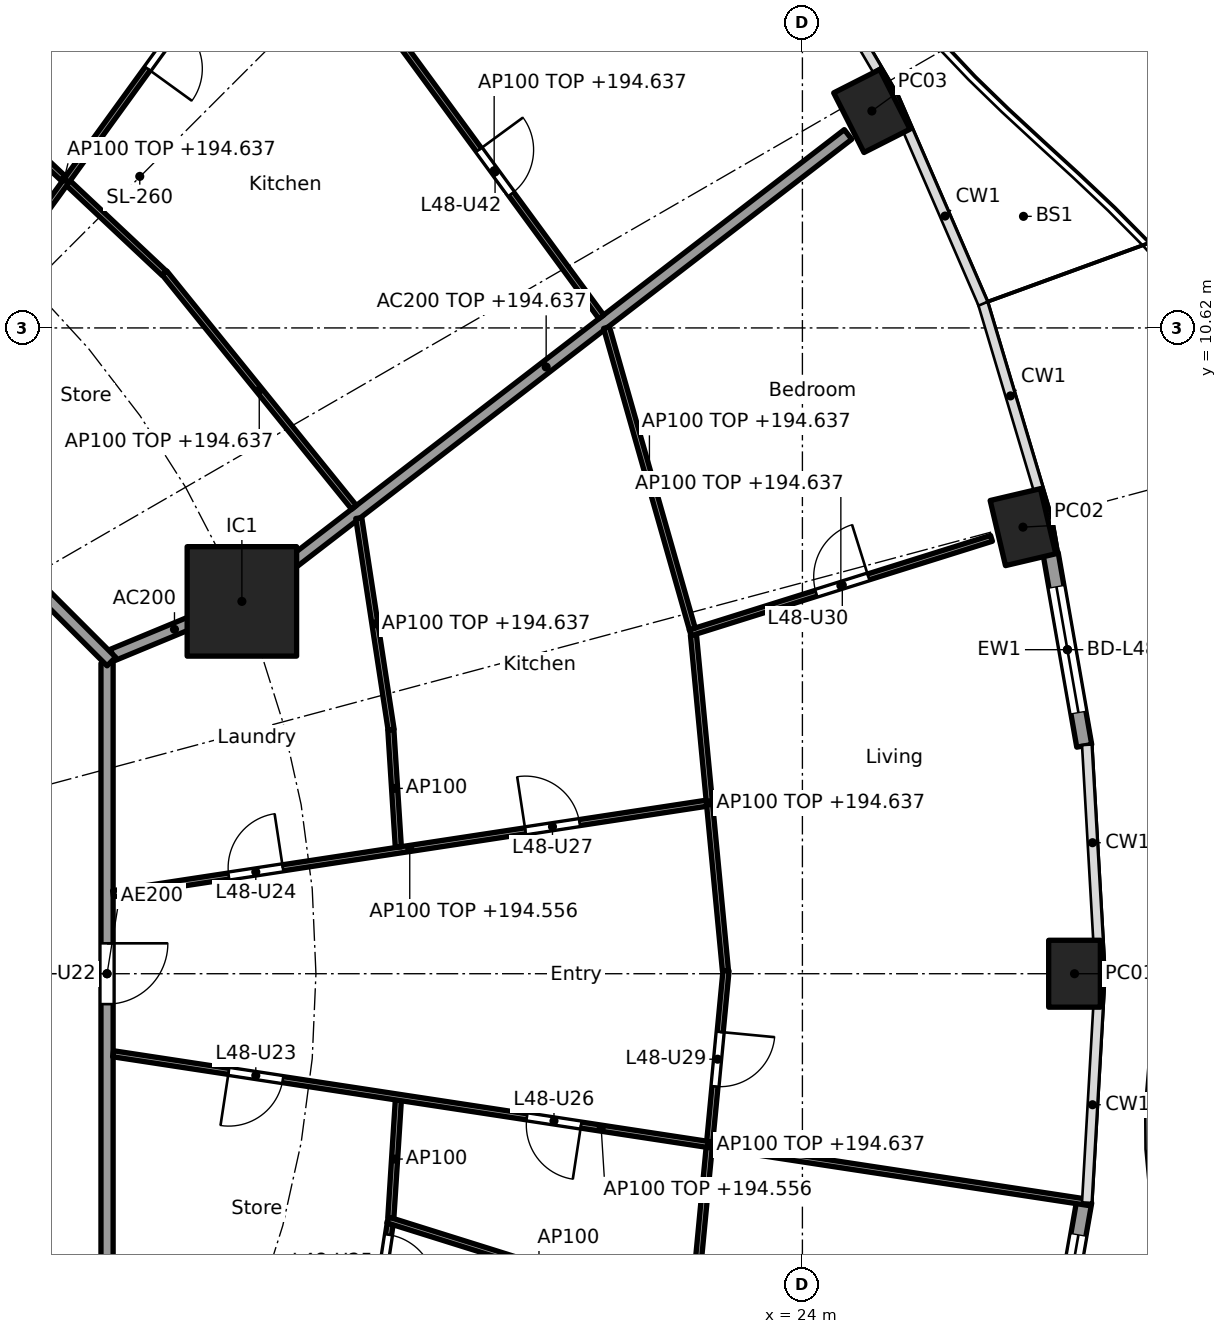
"""IFC4 building model, lengths in metres.
Left out: names, types, materials, properties, quantities, classifications, styles, units other than length and angle.
Written with IfcOpenShell. Run it as: python <this file> out.ifc"""

import sys

from ifc_helpers import new_model, si_unit, direction, frame, frame_2d, origin, origin_2d, place, context, subcontext, project, spatial, rectangle, hollow_rectangle, extrude, element, fill, save


model = new_model("IFC4")
c1 = context("Model", 3, precision=1e-05, world=origin(), true_north=direction((0.0, 1.0)))
c2 = subcontext(c1, "Body", "Model", "MODEL_VIEW")
j1 = project(units=[si_unit("LENGTHUNIT", "METRE"), si_unit("PLANEANGLEUNIT", "RADIAN")], contexts=[c1])
p1 = place(None, origin())
s1 = spatial("IfcSite", under=j1, at=p1, CompositionType="ELEMENT")
p2 = place(p1, origin())
s2 = spatial("IfcBuilding", under=s1, at=p2, CompositionType="ELEMENT")
p3 = place(p2, frame((0.0, 0.0, 191.8)))
s3 = spatial("IfcBuildingStorey", under=s2, at=p3, CompositionType="ELEMENT", Elevation=191.8)
for number, where, z_axis, x_axis in (
    (1, (28.475, 0.0, 0.0), (0.0, 0.0, 1.0), (0.0, 1.0, 0.0)),
    (2, (27.627, 7.344, 0.0), (0.0, 0.0, 1.0), (-0.229, 0.973, 0.0)),
    (3, (25.142, 14.188, 0.0), (0.0, 0.0, 1.0), (-0.452, 0.892, 0.0)),
):
    element("IfcColumn", number, at=place(p3, frame(where, z_axis=z_axis, x_axis=x_axis)), inside=s3, PredefinedType="COLUMN", context=c2, shape_type="SweptSolid", body=[
        extrude(hollow_rectangle(XDim=1.1, YDim=0.85, WallThickness=0.036, at=origin_2d()), origin(), (0.0, 0.0, 1.0), 3.7),
    ])
p4 = place(p3, frame((14.782, 6.123, 0.0), z_axis=(0.0, 0.0, 1.0), x_axis=(1.0, 0.0, 0.0)))
e4 = element("IfcColumn", 4, at=p4, inside=s3, PredefinedType="COLUMN", context=c2, shape_type="SweptSolid", body=[
    extrude(rectangle(XDim=1.8, YDim=1.8, at=origin_2d()), origin(), (0.0, 0.0, 1.0), 3.7),
])
p5 = place(p3, frame((28.082, 6.91, 0.0), z_axis=(0.0, 0.0, 1.0), x_axis=(0.172149769468, -0.985070787747, 0.0)))
e5 = element("IfcWall", 5, at=p5, inside=s3, PredefinedType="SOLIDWALL", context=c2, shape_type="SweptSolid", body=[
    extrude(rectangle(XDim=3.211, YDim=0.25, at=frame_2d((1.605, 0.0))), origin(), (0.0, 0.0, 1.0), 3.44),
])
p6 = place(p5, frame((0.555, 0.0, 0.0)))
e6 = element("IfcOpeningElement", 6, at=p6, cuts=e5, PredefinedType="OPENING", context=c2, shape_type="SweptSolid", body=[
    extrude(rectangle(XDim=2.1, YDim=2.4, at=frame_2d((1.05, 1.2))), frame((0.0, 0.135, 0.0), z_axis=(0.0, -1.0, 0.0), x_axis=(1.0, 0.0, 0.0)), (0.0, 0.0, 1.0), 0.27),
])
p7 = place(p3, frame((28.635, -3.747, 0.0), z_axis=(0.0, 0.0, 1.0), x_axis=(-0.172149769468, -0.985070787747, 0.0)))
e7 = element("IfcWall", 7, at=p7, inside=s3, PredefinedType="SOLIDWALL", context=c2, shape_type="SweptSolid", body=[
    extrude(rectangle(XDim=3.211, YDim=0.25, at=frame_2d((1.605, 0.0))), origin(), (0.0, 0.0, 1.0), 3.44),
])
p8 = place(p7, frame((0.555, 0.0, 0.0)))
e8 = element("IfcOpeningElement", 8, at=p8, cuts=e7, PredefinedType="OPENING", context=c2, shape_type="SweptSolid", body=[
    extrude(rectangle(XDim=2.1, YDim=2.4, at=frame_2d((1.05, 1.2))), frame((0.0, 0.135, 0.0), z_axis=(0.0, -1.0, 0.0), x_axis=(1.0, 0.0, 0.0)), (0.0, 0.0, 1.0), 0.27),
])
p9 = place(p3, frame((12.657, 5.243, 0.0), z_axis=(0.0, 0.0, 1.0), x_axis=(0.92383017907, 0.382802560388, 0.0)))
e9 = element("IfcWall", 9, at=p9, inside=s3, PredefinedType="PARTITIONING", context=c2, shape_type="SweptSolid", body=[
    extrude(rectangle(XDim=2.2, YDim=0.2, at=frame_2d((1.1, 0.0))), origin(), (0.0, 0.0, 1.0), 3.44),
])
p10 = place(p3, frame((14.822, 6.154, 0.0), z_axis=(0.0, 0.0, 1.0), x_axis=(0.792203056092, 0.610257583254, 0.0)))
e10 = element("IfcWall", 10, at=p10, inside=s3, PredefinedType="PARTITIONING", context=c2, shape_type="SweptSolid", body=[
    extrude(rectangle(XDim=12.533, YDim=0.2, at=frame_2d((6.266, 0.0))), origin(), (0.0, 0.0, 1.0), 2.837),
])
p11 = place(p3, frame((12.565, -5.104, 0.0), z_axis=(0.0, 0.0, 1.0), x_axis=(0.0, 1.0, 0.0)))
e11 = element("IfcWall", 11, at=p11, inside=s3, PredefinedType="PARTITIONING", context=c2, shape_type="SweptSolid", body=[
    extrude(rectangle(XDim=10.209, YDim=0.2, at=frame_2d((5.104, 0.0))), origin(), (0.0, 0.0, 1.0), 3.44),
])
p12 = place(p11, frame((4.604, 0.0, 0.0)))
e12 = element("IfcOpeningElement", 12, at=p12, cuts=e11, PredefinedType="OPENING", context=c2, shape_type="SweptSolid", body=[
    extrude(rectangle(XDim=1.0, YDim=2.1, at=frame_2d((0.5, 1.05))), frame((0.0, 0.11, 0.0), z_axis=(0.0, -1.0, 0.0), x_axis=(1.0, 0.0, 0.0)), (0.0, 0.0, 1.0), 0.22),
])
p13 = place(p3, frame((12.635, 5.134, 0.0), z_axis=(0.0, 0.0, 1.0), x_axis=(-0.707106781187, 0.707106781187, 0.0)))
e13 = element("IfcWall", 13, at=p13, inside=s3, PredefinedType="PARTITIONING", context=c2, shape_type="SweptSolid", body=[
    extrude(rectangle(XDim=10.609, YDim=0.2, at=frame_2d((5.305, 0.0))), origin(), (0.0, 0.0, 1.0), 3.44),
])
p14 = place(p3, frame((22.734, 0.05, 0.0), z_axis=(0.0, 0.0, 1.0), x_axis=(-0.094923312677, 0.995484587882, 0.0)))
e14 = element("IfcWall", 14, at=p14, inside=s3, PredefinedType="PARTITIONING", context=c2, shape_type="SweptSolid", body=[
    extrude(rectangle(XDim=5.548, YDim=0.1, at=frame_2d((2.774, 0.0))), origin(), (0.0, 0.0, 1.0), 2.837),
])
p15 = place(p3, frame((22.744, 0.05, 0.0), z_axis=(0.0, 0.0, 1.0), x_axis=(-0.094931362305, -0.995483820286, 0.0)))
e15 = element("IfcWall", 15, at=p15, inside=s3, PredefinedType="PARTITIONING", context=c2, shape_type="SweptSolid", body=[
    extrude(rectangle(XDim=5.748, YDim=0.1, at=frame_2d((2.874, 0.0))), origin(), (0.0, 0.0, 1.0), 2.837),
])
p16 = place(p15, frame((1.012, 0.0, 0.0)))
e16 = element("IfcOpeningElement", 16, at=p16, cuts=e15, PredefinedType="OPENING", context=c2, shape_type="SweptSolid", body=[
    extrude(rectangle(XDim=0.9, YDim=2.1, at=frame_2d((0.45, 1.05))), frame((0.0, 0.06, 0.0), z_axis=(0.0, -1.0, 0.0), x_axis=(1.0, 0.0, 0.0)), (0.0, 0.0, 1.0), 0.12),
])
p17 = place(p3, frame((12.664, 1.316, 0.0), z_axis=(0.0, 0.0, 1.0), x_axis=(0.988579217853, 0.150702123505, 0.0)))
e17 = element("IfcWall", 17, at=p17, inside=s3, PredefinedType="PARTITIONING", context=c2, shape_type="SweptSolid", body=[
    extrude(rectangle(XDim=9.871, YDim=0.1, at=frame_2d((4.936, 0.0))), origin(), (0.0, 0.0, 1.0), 2.756),
])
p18 = place(p17, frame((1.924, 0.0, 0.0)))
e18 = element("IfcOpeningElement", 18, at=p18, cuts=e17, PredefinedType="OPENING", context=c2, shape_type="SweptSolid", body=[
    extrude(rectangle(XDim=0.9, YDim=2.1, at=frame_2d((0.45, 1.05))), frame((0.0, 0.06, 0.0), z_axis=(0.0, -1.0, 0.0), x_axis=(1.0, 0.0, 0.0)), (0.0, 0.0, 1.0), 0.12),
])
p19 = place(p17, frame((6.86, 0.0, 0.0)))
e19 = element("IfcOpeningElement", 19, at=p19, cuts=e17, PredefinedType="OPENING", context=c2, shape_type="SweptSolid", body=[
    extrude(rectangle(XDim=0.9, YDim=2.1, at=frame_2d((0.45, 1.05))), frame((0.0, 0.06, 0.0), z_axis=(0.0, -1.0, 0.0), x_axis=(1.0, 0.0, 0.0)), (0.0, 0.0, 1.0), 0.12),
])
p20 = place(p3, frame((17.355, 2.082, 0.0), z_axis=(0.0, 0.0, 1.0), x_axis=(-0.063689464349, 0.997969765139, 0.0)))
e20 = element("IfcWall", 20, at=p20, inside=s3, PredefinedType="PARTITIONING", context=c2, shape_type="SweptSolid", body=[
    extrude(rectangle(XDim=1.936, YDim=0.1, at=frame_2d((0.968, 0.0))), origin(), (0.0, 0.0, 1.0), 3.44),
])
p21 = place(p3, frame((17.236, 4.014, 0.0), z_axis=(0.0, 0.0, 1.0), x_axis=(-0.151087537093, 0.988520387314, 0.0)))
e21 = element("IfcWall", 21, at=p21, inside=s3, PredefinedType="PARTITIONING", context=c2, shape_type="SweptSolid", body=[
    extrude(rectangle(XDim=3.519, YDim=0.1, at=frame_2d((1.76, 0.0))), origin(), (0.0, 0.0, 1.0), 2.837),
])
p22 = place(p3, frame((22.155, 5.607, 0.0), z_axis=(0.0, 0.0, 1.0), x_axis=(0.954251251005, 0.299005936321, 0.0)))
e22 = element("IfcWall", 22, at=p22, inside=s3, PredefinedType="PARTITIONING", context=c2, shape_type="SweptSolid", body=[
    extrude(rectangle(XDim=5.191, YDim=0.1, at=frame_2d((2.596, 0.0))), origin(), (0.0, 0.0, 1.0), 2.837),
])
p23 = place(p22, frame((2.171, 0.0, 0.0)))
e23 = element("IfcOpeningElement", 23, at=p23, cuts=e22, PredefinedType="OPENING", context=c2, shape_type="SweptSolid", body=[
    extrude(rectangle(XDim=0.9, YDim=2.1, at=frame_2d((0.45, 1.05))), frame((0.0, 0.06, 0.0), z_axis=(0.0, -1.0, 0.0), x_axis=(1.0, 0.0, 0.0)), (0.0, 0.0, 1.0), 0.12),
])
p24 = place(p3, frame((22.189, 5.67, 0.0), z_axis=(0.0, 0.0, 1.0), x_axis=(-0.273819702124, 0.961781040949, 0.0)))
e24 = element("IfcWall", 24, at=p24, inside=s3, PredefinedType="PARTITIONING", context=c2, shape_type="SweptSolid", body=[
    extrude(rectangle(XDim=5.152, YDim=0.1, at=frame_2d((2.576, 0.0))), origin(), (0.0, 0.0, 1.0), 2.837),
])
p25 = place(p3, frame((16.626, 7.67, 0.0), z_axis=(0.0, 0.0, 1.0), x_axis=(-0.628764602857, 0.777595700987, 0.0)))
e25 = element("IfcWall", 25, at=p25, inside=s3, PredefinedType="PARTITIONING", context=c2, shape_type="SweptSolid", body=[
    extrude(rectangle(XDim=4.957, YDim=0.1, at=frame_2d((2.479, 0.0))), origin(), (0.0, 0.0, 1.0), 2.837),
])
p26 = place(p3, frame((20.692, 10.802, 0.0), z_axis=(0.0, 0.0, 1.0), x_axis=(-0.591122127251, 0.806582066918, 0.0)))
e26 = element("IfcWall", 26, at=p26, inside=s3, PredefinedType="PARTITIONING", context=c2, shape_type="SweptSolid", body=[
    extrude(rectangle(XDim=5.96, YDim=0.1, at=frame_2d((2.98, 0.0))), origin(), (0.0, 0.0, 1.0), 2.837),
])
p27 = place(p26, frame((2.505, 0.0, 0.0)))
e27 = element("IfcOpeningElement", 27, at=p27, cuts=e26, PredefinedType="OPENING", context=c2, shape_type="SweptSolid", body=[
    extrude(rectangle(XDim=0.9, YDim=2.1, at=frame_2d((0.45, 1.05))), frame((0.0, 0.06, 0.0), z_axis=(0.0, -1.0, 0.0), x_axis=(1.0, 0.0, 0.0)), (0.0, 0.0, 1.0), 0.12),
])
p28 = place(p3, frame((13.504, 11.52, 0.0), z_axis=(0.0, 0.0, 1.0), x_axis=(-0.728883199496, 0.684638066055, 0.0)))
e28 = element("IfcWall", 28, at=p28, inside=s3, PredefinedType="PARTITIONING", context=c2, shape_type="SweptSolid", body=[
    extrude(rectangle(XDim=4.519, YDim=0.1, at=frame_2d((2.26, 0.0))), origin(), (0.0, 0.0, 1.0), 2.837),
])
p29 = place(p3, frame((8.943, 8.966, 0.0), z_axis=(0.0, 0.0, 1.0), x_axis=(0.586803608919, 0.809729290912, 0.0)))
e29 = element("IfcWall", 29, at=p29, inside=s3, PredefinedType="PARTITIONING", context=c2, shape_type="SweptSolid", body=[
    extrude(rectangle(XDim=17.179, YDim=0.1, at=frame_2d((8.589, 0.0))), origin(), (0.0, 0.0, 1.0), 2.756),
])
p30 = place(p29, frame((2.062, 0.0, 0.0)))
e30 = element("IfcOpeningElement", 30, at=p30, cuts=e29, PredefinedType="OPENING", context=c2, shape_type="SweptSolid", body=[
    extrude(rectangle(XDim=0.9, YDim=2.1, at=frame_2d((0.45, 1.05))), frame((0.0, 0.06, 0.0), z_axis=(0.0, -1.0, 0.0), x_axis=(1.0, 0.0, 0.0)), (0.0, 0.0, 1.0), 0.12),
])
p31 = place(p29, frame((7.308, 0.0, 0.0)))
e31 = element("IfcOpeningElement", 31, at=p31, cuts=e29, PredefinedType="OPENING", context=c2, shape_type="SweptSolid", body=[
    extrude(rectangle(XDim=0.9, YDim=2.1, at=frame_2d((0.45, 1.05))), frame((0.0, 0.06, 0.0), z_axis=(0.0, -1.0, 0.0), x_axis=(1.0, 0.0, 0.0)), (0.0, 0.0, 1.0), 0.12),
])
p32 = place(p3, frame((16.704, -7.493, 0.0), z_axis=(0.0, 0.0, 1.0), x_axis=(0.1510806336, 0.988521442434, 0.0)))
e32 = element("IfcWall", 32, at=p32, inside=s3, PredefinedType="PARTITIONING", context=c2, shape_type="SweptSolid", body=[
    extrude(rectangle(XDim=3.419, YDim=0.1, at=frame_2d((1.71, 0.0))), origin(), (0.0, 0.0, 1.0), 2.837),
])
p33 = place(p32, frame((2.339, 0.0, 0.0)))
e33 = element("IfcOpeningElement", 33, at=p33, cuts=e32, PredefinedType="OPENING", context=c2, shape_type="SweptSolid", body=[
    extrude(rectangle(XDim=0.9, YDim=2.1, at=frame_2d((0.45, 1.05))), frame((0.0, 0.06, 0.0), z_axis=(0.0, -1.0, 0.0), x_axis=(1.0, 0.0, 0.0)), (0.0, 0.0, 1.0), 0.12),
])
p34 = place(p3, frame((17.181, -4.049, 0.0), z_axis=(0.0, 0.0, 1.0), x_axis=(0.954246359918, -0.299021545351, 0.0)))
e34 = element("IfcWall", 34, at=p34, inside=s3, PredefinedType="PARTITIONING", context=c2, shape_type="SweptSolid", body=[
    extrude(rectangle(XDim=5.213, YDim=0.1, at=frame_2d((2.606, 0.0))), origin(), (0.0, 0.0, 1.0), 3.44),
])
p35 = place(p3, frame((17.232, -4.014, 0.0), z_axis=(0.0, 0.0, 1.0), x_axis=(0.063689464349, 0.997969765139, 0.0)))
e35 = element("IfcWall", 35, at=p35, inside=s3, PredefinedType="PARTITIONING", context=c2, shape_type="SweptSolid", body=[
    extrude(rectangle(XDim=1.936, YDim=0.1, at=frame_2d((0.968, 0.0))), origin(), (0.0, 0.0, 1.0), 3.44),
])
p36 = place(p3, frame((12.664, -1.316, 0.0), z_axis=(0.0, 0.0, 1.0), x_axis=(0.988585177081, -0.150663026836, 0.0)))
e36 = element("IfcWall", 36, at=p36, inside=s3, PredefinedType="PARTITIONING", context=c2, shape_type="SweptSolid", body=[
    extrude(rectangle(XDim=16.24, YDim=0.1, at=frame_2d((8.12, 0.0))), origin(), (0.0, 0.0, 1.0), 2.756),
])
p37 = place(p36, frame((1.924, 0.0, 0.0)))
e37 = element("IfcOpeningElement", 37, at=p37, cuts=e36, PredefinedType="OPENING", context=c2, shape_type="SweptSolid", body=[
    extrude(rectangle(XDim=0.9, YDim=2.1, at=frame_2d((0.45, 1.05))), frame((0.0, 0.06, 0.0), z_axis=(0.0, -1.0, 0.0), x_axis=(1.0, 0.0, 0.0)), (0.0, 0.0, 1.0), 0.12),
])
p38 = place(p36, frame((6.885, 0.0, 0.0)))
e38 = element("IfcOpeningElement", 38, at=p38, cuts=e36, PredefinedType="OPENING", context=c2, shape_type="SweptSolid", body=[
    extrude(rectangle(XDim=0.9, YDim=2.1, at=frame_2d((0.45, 1.05))), frame((0.0, 0.06, 0.0), z_axis=(0.0, -1.0, 0.0), x_axis=(1.0, 0.0, 0.0)), (0.0, 0.0, 1.0), 0.12),
])
p39 = place(p6, origin())
e39 = element("IfcDoor", 39, at=p39, inside=s3, OperationType="SLIDING_TO_LEFT", PredefinedType="DOOR", context=c2, shape_type="SweptSolid", body=[
    extrude(rectangle(XDim=2.1, YDim=2.4, at=frame_2d((1.05, 1.2))), frame((0.0, 0.025, 0.0), z_axis=(0.0, -1.0, 0.0), x_axis=(1.0, 0.0, 0.0)), (0.0, 0.0, 1.0), 0.05),
])
fill(e6, e39)
p40 = place(p8, origin())
e40 = element("IfcDoor", 40, at=p40, inside=s3, OperationType="SLIDING_TO_LEFT", PredefinedType="DOOR", context=c2, shape_type="SweptSolid", body=[
    extrude(rectangle(XDim=2.1, YDim=2.4, at=frame_2d((1.05, 1.2))), frame((0.0, 0.025, 0.0), z_axis=(0.0, -1.0, 0.0), x_axis=(1.0, 0.0, 0.0)), (0.0, 0.0, 1.0), 0.05),
])
fill(e8, e40)
p41 = place(p12, frame((1.0, 0.0, 0.0), x_axis=(-1.0, 0.0, 0.0)))
e41 = element("IfcDoor", 41, at=p41, inside=s3, OperationType="SINGLE_SWING_LEFT", PredefinedType="DOOR", context=c2, shape_type="SweptSolid", body=[
    extrude(rectangle(XDim=1.0, YDim=2.1, at=frame_2d((0.5, 1.05))), frame((0.0, 0.025, 0.0), z_axis=(0.0, -1.0, 0.0), x_axis=(1.0, 0.0, 0.0)), (0.0, 0.0, 1.0), 0.05),
])
fill(e12, e41)
p42 = place(p37, frame((0.9, 0.0, 0.0), x_axis=(-1.0, 0.0, 0.0)))
e42 = element("IfcDoor", 42, at=p42, inside=s3, OperationType="SINGLE_SWING_RIGHT", PredefinedType="DOOR", context=c2, shape_type="SweptSolid", body=[
    extrude(rectangle(XDim=0.9, YDim=2.1, at=frame_2d((0.45, 1.05))), frame((0.0, 0.025, 0.0), z_axis=(0.0, -1.0, 0.0), x_axis=(1.0, 0.0, 0.0)), (0.0, 0.0, 1.0), 0.05),
])
fill(e37, e42)
p43 = place(p18, origin())
e43 = element("IfcDoor", 43, at=p43, inside=s3, OperationType="SINGLE_SWING_RIGHT", PredefinedType="DOOR", context=c2, shape_type="SweptSolid", body=[
    extrude(rectangle(XDim=0.9, YDim=2.1, at=frame_2d((0.45, 1.05))), frame((0.0, 0.025, 0.0), z_axis=(0.0, -1.0, 0.0), x_axis=(1.0, 0.0, 0.0)), (0.0, 0.0, 1.0), 0.05),
])
fill(e18, e43)
p44 = place(p33, frame((0.9, 0.0, 0.0), x_axis=(-1.0, 0.0, 0.0)))
e44 = element("IfcDoor", 44, at=p44, inside=s3, OperationType="SINGLE_SWING_RIGHT", PredefinedType="DOOR", context=c2, shape_type="SweptSolid", body=[
    extrude(rectangle(XDim=0.9, YDim=2.1, at=frame_2d((0.45, 1.05))), frame((0.0, 0.025, 0.0), z_axis=(0.0, -1.0, 0.0), x_axis=(1.0, 0.0, 0.0)), (0.0, 0.0, 1.0), 0.05),
])
fill(e33, e44)
p45 = place(p38, frame((0.9, 0.0, 0.0), x_axis=(-1.0, 0.0, 0.0)))
e45 = element("IfcDoor", 45, at=p45, inside=s3, OperationType="SINGLE_SWING_LEFT", PredefinedType="DOOR", context=c2, shape_type="SweptSolid", body=[
    extrude(rectangle(XDim=0.9, YDim=2.1, at=frame_2d((0.45, 1.05))), frame((0.0, 0.025, 0.0), z_axis=(0.0, -1.0, 0.0), x_axis=(1.0, 0.0, 0.0)), (0.0, 0.0, 1.0), 0.05),
])
fill(e38, e45)
p46 = place(p19, origin())
e46 = element("IfcDoor", 46, at=p46, inside=s3, OperationType="SINGLE_SWING_LEFT", PredefinedType="DOOR", context=c2, shape_type="SweptSolid", body=[
    extrude(rectangle(XDim=0.9, YDim=2.1, at=frame_2d((0.45, 1.05))), frame((0.0, 0.025, 0.0), z_axis=(0.0, -1.0, 0.0), x_axis=(1.0, 0.0, 0.0)), (0.0, 0.0, 1.0), 0.05),
])
fill(e19, e46)
p47 = place(p16, origin())
e47 = element("IfcDoor", 47, at=p47, inside=s3, OperationType="SINGLE_SWING_LEFT", PredefinedType="DOOR", context=c2, shape_type="SweptSolid", body=[
    extrude(rectangle(XDim=0.9, YDim=2.1, at=frame_2d((0.45, 1.05))), frame((0.0, 0.025, 0.0), z_axis=(0.0, -1.0, 0.0), x_axis=(1.0, 0.0, 0.0)), (0.0, 0.0, 1.0), 0.05),
])
fill(e16, e47)
p48 = place(p23, origin())
e48 = element("IfcDoor", 48, at=p48, inside=s3, OperationType="SINGLE_SWING_RIGHT", PredefinedType="DOOR", context=c2, shape_type="SweptSolid", body=[
    extrude(rectangle(XDim=0.9, YDim=2.1, at=frame_2d((0.45, 1.05))), frame((0.0, 0.025, 0.0), z_axis=(0.0, -1.0, 0.0), x_axis=(1.0, 0.0, 0.0)), (0.0, 0.0, 1.0), 0.05),
])
fill(e23, e48)
p49 = place(p31, frame((0.9, 0.0, 0.0), x_axis=(-1.0, 0.0, 0.0)))
e49 = element("IfcDoor", 49, at=p49, inside=s3, OperationType="SINGLE_SWING_RIGHT", PredefinedType="DOOR", context=c2, shape_type="SweptSolid", body=[
    extrude(rectangle(XDim=0.9, YDim=2.1, at=frame_2d((0.45, 1.05))), frame((0.0, 0.025, 0.0), z_axis=(0.0, -1.0, 0.0), x_axis=(1.0, 0.0, 0.0)), (0.0, 0.0, 1.0), 0.05),
])
fill(e31, e49)
p50 = place(p27, frame((0.9, 0.0, 0.0), x_axis=(-1.0, 0.0, 0.0)))
e50 = element("IfcDoor", 50, at=p50, inside=s3, OperationType="SINGLE_SWING_LEFT", PredefinedType="DOOR", context=c2, shape_type="SweptSolid", body=[
    extrude(rectangle(XDim=0.9, YDim=2.1, at=frame_2d((0.45, 1.05))), frame((0.0, 0.025, 0.0), z_axis=(0.0, -1.0, 0.0), x_axis=(1.0, 0.0, 0.0)), (0.0, 0.0, 1.0), 0.05),
])
fill(e27, e50)
save(model, sys.argv[1])
